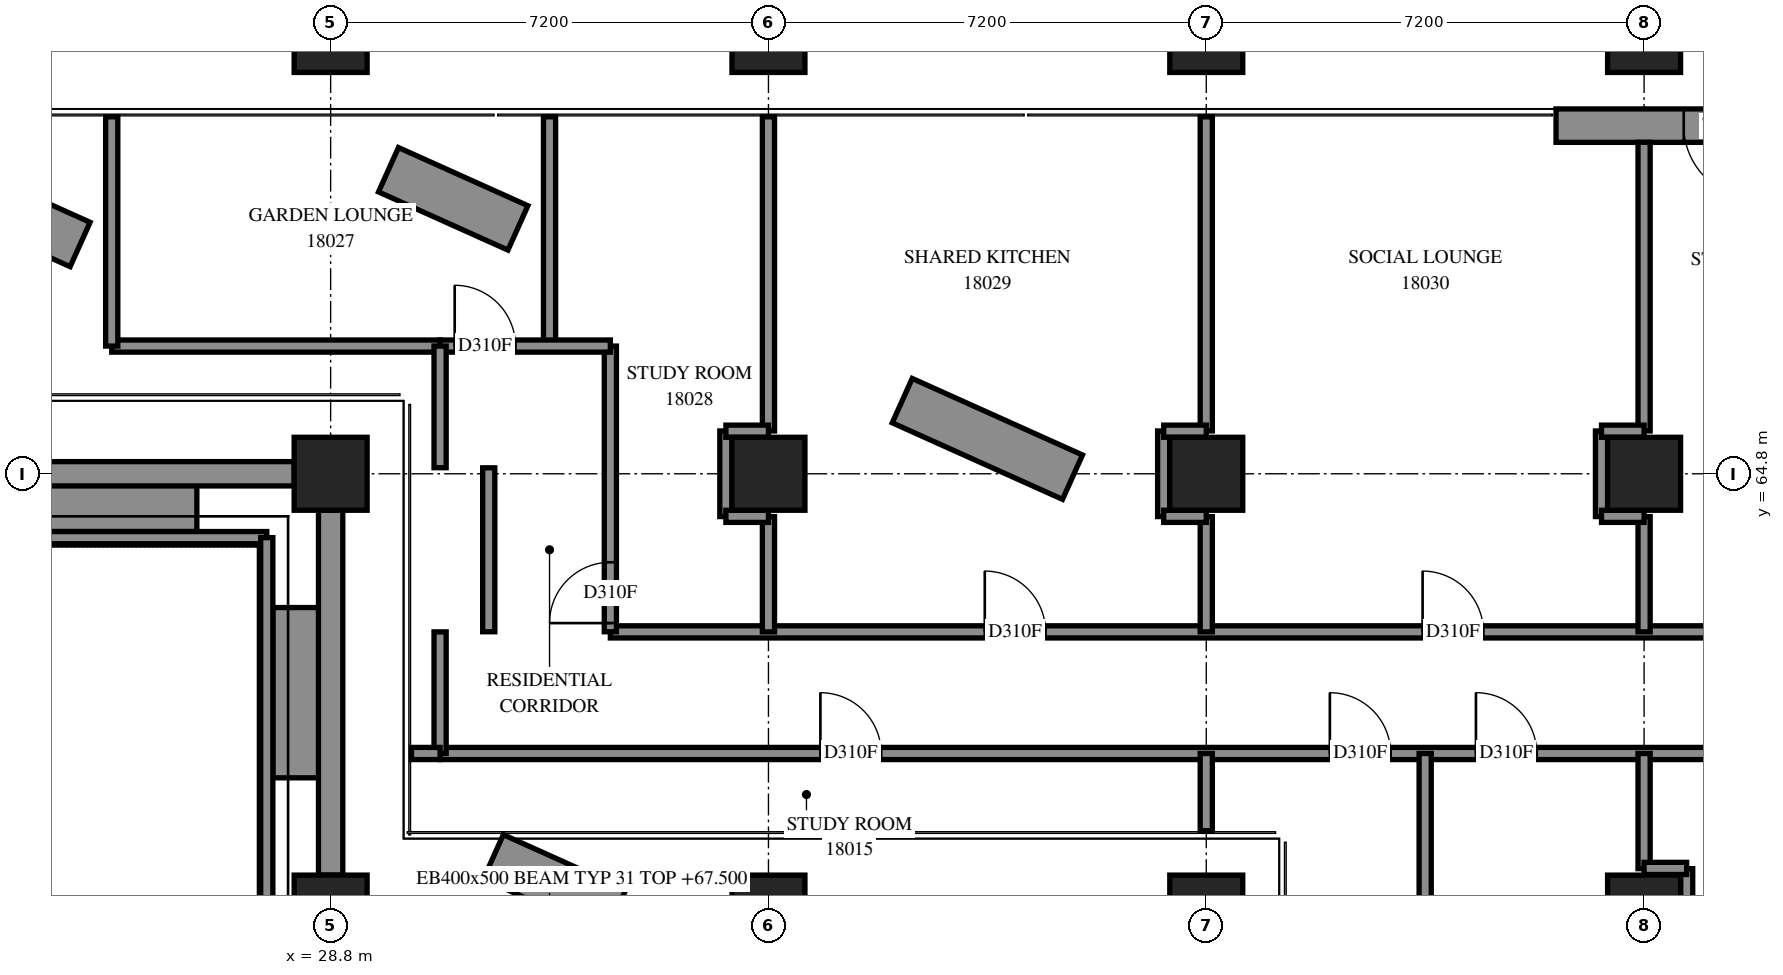
"""IFC4 building model, lengths in metres.
Left out: names, types, materials, properties, quantities, classifications, styles, units other than length and angle.
Written with IfcOpenShell. Run it as: python <this file> out.ifc"""

import sys

from ifc_helpers import new_model, si_unit, direction, frame, frame_2d, origin, origin_2d, place, context, subcontext, project, spatial, polyline, rectangle, outline, extrude, element, fill, save


model = new_model("IFC4")
c1 = context("Model", 3, precision=1e-05, world=origin(), true_north=direction((0.0, 1.0)))
c2 = subcontext(c1, "Body", "Model", "MODEL_VIEW")
j1 = project(units=[si_unit("LENGTHUNIT", "METRE"), si_unit("PLANEANGLEUNIT", "RADIAN")], contexts=[c1])
p1 = place(None, origin())
s1 = spatial("IfcSite", under=j1, at=p1, CompositionType="ELEMENT")
p2 = place(p1, origin())
s2 = spatial("IfcBuilding", under=s1, at=p2, CompositionType="ELEMENT")
p3 = place(p2, frame((0.0, 0.0, 67.8)))
s3 = spatial("IfcBuildingStorey", under=s2, at=p3, CompositionType="ELEMENT", Elevation=67.8)
for number, where, z_axis, x_axis in (
    (1, (28.8, 57.6, 0.0), (0.0, 0.0, 1.0), (1.0, 0.0, 0.0)),
    (2, (28.8, 64.8, 0.0), (0.0, 0.0, 1.0), (1.0, 0.0, 0.0)),
    (3, (28.8, 72.0, 0.0), (0.0, 0.0, 1.0), (1.0, 0.0, 0.0)),
    (4, (36.0, 57.6, 0.0), (0.0, 0.0, 1.0), (1.0, 0.0, 0.0)),
    (5, (36.0, 64.8, 0.0), (0.0, 0.0, 1.0), (1.0, 0.0, 0.0)),
    (6, (36.0, 72.0, 0.0), (0.0, 0.0, 1.0), (1.0, 0.0, 0.0)),
    (7, (43.2, 57.6, 0.0), (0.0, 0.0, 1.0), (1.0, 0.0, 0.0)),
    (8, (43.2, 64.8, 0.0), (0.0, 0.0, 1.0), (1.0, 0.0, 0.0)),
    (9, (43.2, 72.0, 0.0), (0.0, 0.0, 1.0), (1.0, 0.0, 0.0)),
    (10, (50.4, 57.6, 0.0), (0.0, 0.0, 1.0), (1.0, 0.0, 0.0)),
    (11, (50.4, 64.8, 0.0), (0.0, 0.0, 1.0), (1.0, 0.0, 0.0)),
    (12, (50.4, 72.0, 0.0), (0.0, 0.0, 1.0), (1.0, 0.0, 0.0)),
):
    element("IfcColumn", number, at=place(p3, frame(where, z_axis=z_axis, x_axis=x_axis)), inside=s3, PredefinedType="COLUMN", context=c2, shape_type="SweptSolid", body=[
        extrude(rectangle(XDim=1.2, YDim=1.2, at=origin_2d()), origin(), (0.0, 0.0, 1.0), 3.9),
    ])
p4 = place(p3, frame((52.552, 70.525, 0.0), z_axis=(0.0, 0.0, 1.0), x_axis=(-1.0, 0.0, 0.0)))
e13 = element("IfcWall", 13, at=p4, inside=s3, PredefinedType="SOLIDWALL", context=c2, shape_type="SweptSolid", body=[
    extrude(rectangle(XDim=3.6, YDim=0.55, at=frame_2d((1.8, 0.0))), origin(), (0.0, 0.0, 1.0), 3.9),
])
p5 = place(p4, frame((0.3, 0.0, 0.0)))
e14 = element("IfcOpeningElement", 14, at=p5, cuts=e13, PredefinedType="OPENING", context=c2, shape_type="SweptSolid", body=[
    extrude(rectangle(XDim=1.2, YDim=2.4, at=frame_2d((0.6, 1.2))), frame((0.0, 0.285, 0.0), z_axis=(0.0, -1.0, 0.0), x_axis=(1.0, 0.0, 0.0)), (0.0, 0.0, 1.0), 0.57),
])
for number, where, z_axis, x_axis in (
    (15, (23.8, 64.25, 0.0), (0.0, 0.0, 1.0), (1.0, 0.0, 0.0)),
    (16, (28.25, 62.6, 0.0), (0.0, 0.0, 1.0), (0.0, -1.0, 0.0)),
):
    element("IfcWall", number, at=place(p3, frame(where, z_axis=z_axis, x_axis=x_axis)), inside=s3, PredefinedType="SOLIDWALL", context=c2, shape_type="SweptSolid", body=[
        extrude(rectangle(XDim=2.8, YDim=0.8, at=frame_2d((1.4, 0.0))), origin(), (0.0, 0.0, 1.0), 0.65),
    ])
p6 = place(p3, frame((41.0, 64.744, 0.0), z_axis=(0.0, 0.0, 1.0), x_axis=(-0.9121164493, 0.4099311928, 0.0)))
e17 = element("IfcWall", 17, at=p6, inside=s3, PredefinedType="SOLIDWALL", context=c2, shape_type="SweptSolid", body=[
    extrude(rectangle(XDim=3.07, YDim=0.8, at=frame_2d((1.535, 0.0))), origin(), (0.0, 0.0, 1.0), 0.65),
])
p7 = place(p3, frame((31.88, 68.843, 0.0), z_axis=(0.0, 0.0, 1.0), x_axis=(-0.9121090242, 0.4099477137, 0.0)))
e18 = element("IfcWall", 18, at=p7, inside=s3, PredefinedType="SOLIDWALL", context=c2, shape_type="SweptSolid", body=[
    extrude(rectangle(XDim=2.334, YDim=0.8, at=frame_2d((1.167, 0.0))), origin(), (0.0, 0.0, 1.0), 0.65),
])
p8 = place(p3, frame((33.49, 57.594, 0.0), z_axis=(0.0, 0.0, 1.0), x_axis=(-0.9121179196, 0.4099279215, 0.0)))
e19 = element("IfcWall", 19, at=p8, inside=s3, PredefinedType="SOLIDWALL", context=c2, shape_type="SweptSolid", body=[
    extrude(rectangle(XDim=2.209, YDim=0.8, at=frame_2d((1.104, 0.0))), origin(), (0.0, 0.0, 1.0), 0.65),
])
p9 = place(p3, frame((20.55, 63.75, 0.0), z_axis=(0.0, 0.0, 1.0), x_axis=(1.0, 0.0, 0.0)))
e20 = element("IfcWall", 20, at=p9, inside=s3, PredefinedType="SOLIDWALL", context=c2, shape_type="SweptSolid", body=[
    extrude(outline(polyline([(-0.1, -0.1), (7.1, -0.1), (7.3, 0.1), (0.1, 0.1), (-0.1, -0.1)])), origin(), (0.0, 0.0, 1.0), 4.2),
])
p10 = place(p3, frame((27.75, 63.75, 0.0), z_axis=(0.0, 0.0, 1.0), x_axis=(0.0, -1.0, 0.0)))
e21 = element("IfcWall", 21, at=p10, inside=s3, PredefinedType="SOLIDWALL", context=c2, shape_type="SweptSolid", body=[
    extrude(outline(polyline([(0.1, -0.1), (7.3, -0.1), (7.1, 0.1), (-0.1, 0.1), (0.1, -0.1)])), origin(), (0.0, 0.0, 1.0), 4.2),
])
p11 = place(p3, frame((30.6, 60.2, 0.0), z_axis=(0.0, 0.0, 1.0), x_axis=(1.0, 0.0, 0.0)))
e22 = element("IfcWall", 22, at=p11, inside=s3, PredefinedType="PARTITIONING", context=c2, shape_type="SweptSolid", body=[
    extrude(rectangle(XDim=22.4, YDim=0.2, at=frame_2d((11.2, 0.0))), origin(), (0.0, 0.0, 1.0), 3.9),
])
p12 = place(p11, frame((6.254, 0.0, 0.0)))
e23 = element("IfcOpeningElement", 23, at=p12, cuts=e22, PredefinedType="OPENING", context=c2, shape_type="SweptSolid", body=[
    extrude(rectangle(XDim=1.0, YDim=2.1, at=frame_2d((0.5, 1.05))), frame((0.0, 0.11, 0.0), z_axis=(0.0, -1.0, 0.0), x_axis=(1.0, 0.0, 0.0)), (0.0, 0.0, 1.0), 0.22),
])
p13 = place(p11, frame((14.633, 0.0, 0.0)))
e24 = element("IfcOpeningElement", 24, at=p13, cuts=e22, PredefinedType="OPENING", context=c2, shape_type="SweptSolid", body=[
    extrude(rectangle(XDim=1.0, YDim=2.1, at=frame_2d((0.5, 1.05))), frame((0.0, 0.11, 0.0), z_axis=(0.0, -1.0, 0.0), x_axis=(1.0, 0.0, 0.0)), (0.0, 0.0, 1.0), 0.22),
])
p14 = place(p11, frame((17.035, 0.0, 0.0)))
e25 = element("IfcOpeningElement", 25, at=p14, cuts=e22, PredefinedType="OPENING", context=c2, shape_type="SweptSolid", body=[
    extrude(rectangle(XDim=1.0, YDim=2.1, at=frame_2d((0.5, 1.05))), frame((0.0, 0.11, 0.0), z_axis=(0.0, -1.0, 0.0), x_axis=(1.0, 0.0, 0.0)), (0.0, 0.0, 1.0), 0.22),
])
p15 = place(p11, frame((21.205, 0.0, 0.0)))
e26 = element("IfcOpeningElement", 26, at=p15, cuts=e22, PredefinedType="OPENING", context=c2, shape_type="SweptSolid", body=[
    extrude(rectangle(XDim=1.0, YDim=2.1, at=frame_2d((0.5, 1.05))), frame((0.0, 0.11, 0.0), z_axis=(0.0, -1.0, 0.0), x_axis=(1.0, 0.0, 0.0)), (0.0, 0.0, 1.0), 0.22),
])
p16 = place(p3, frame((33.4, 62.2, 0.0), z_axis=(0.0, 0.0, 1.0), x_axis=(1.0, 0.0, 0.0)))
e27 = element("IfcWall", 27, at=p16, inside=s3, PredefinedType="PARTITIONING", context=c2, shape_type="SweptSolid", body=[
    extrude(rectangle(XDim=21.3, YDim=0.2, at=frame_2d((10.65, 0.0))), origin(), (0.0, 0.0, 1.0), 3.9),
])
p17 = place(p16, frame((6.157, 0.0, 0.0)))
e28 = element("IfcOpeningElement", 28, at=p17, cuts=e27, PredefinedType="OPENING", context=c2, shape_type="SweptSolid", body=[
    extrude(rectangle(XDim=1.0, YDim=2.1, at=frame_2d((0.5, 1.05))), frame((0.0, 0.11, 0.0), z_axis=(0.0, -1.0, 0.0), x_axis=(1.0, 0.0, 0.0)), (0.0, 0.0, 1.0), 0.22),
])
p18 = place(p16, frame((13.357, 0.0, 0.0)))
e29 = element("IfcOpeningElement", 29, at=p18, cuts=e27, PredefinedType="OPENING", context=c2, shape_type="SweptSolid", body=[
    extrude(rectangle(XDim=1.0, YDim=2.1, at=frame_2d((0.5, 1.05))), frame((0.0, 0.11, 0.0), z_axis=(0.0, -1.0, 0.0), x_axis=(1.0, 0.0, 0.0)), (0.0, 0.0, 1.0), 0.22),
])
p19 = place(p16, frame((18.765, 0.0, 0.0)))
e30 = element("IfcOpeningElement", 30, at=p19, cuts=e27, PredefinedType="OPENING", context=c2, shape_type="SweptSolid", body=[
    extrude(rectangle(XDim=1.0, YDim=2.1, at=frame_2d((0.5, 1.05))), frame((0.0, 0.11, 0.0), z_axis=(0.0, -1.0, 0.0), x_axis=(1.0, 0.0, 0.0)), (0.0, 0.0, 1.0), 0.22),
])
p20 = place(p3, frame((46.8, 51.73, 0.0), z_axis=(0.0, 0.0, 1.0), x_axis=(0.0, 1.0, 0.0)))
e31 = element("IfcWall", 31, at=p20, inside=s3, PredefinedType="PARTITIONING", context=c2, shape_type="SweptSolid", body=[
    extrude(rectangle(XDim=8.47, YDim=0.2, at=frame_2d((4.235, 0.0))), origin(), (0.0, 0.0, 1.0), 3.9),
])
p21 = place(p3, frame((25.2, 66.9, 0.0), z_axis=(0.0, 0.0, 1.0), x_axis=(1.0, 0.0, 0.0)))
e32 = element("IfcWall", 32, at=p21, inside=s3, PredefinedType="PARTITIONING", context=c2, shape_type="SweptSolid", body=[
    extrude(rectangle(XDim=5.4, YDim=0.2, at=frame_2d((2.7, 0.0))), origin(), (0.0, 0.0, 1.0), 3.9),
])
for number, where, z_axis, x_axis in (
    (33, (36.0, 65.504, 0.0), (0.0, 0.0, 1.0), (0.0, 1.0, 0.0)),
    (34, (43.2, 65.504, 0.0), (0.0, 0.0, 1.0), (0.0, 1.0, 0.0)),
):
    element("IfcWall", number, at=place(p3, frame(where, z_axis=z_axis, x_axis=x_axis)), inside=s3, PredefinedType="PARTITIONING", context=c2, shape_type="SweptSolid", body=[
        extrude(rectangle(XDim=5.166, YDim=0.2, at=frame_2d((2.583, 0.0))), origin(), (0.0, 0.0, 1.0), 3.9),
    ])
p22 = place(p3, frame((50.4, 65.504, 0.0), z_axis=(0.0, 0.0, 1.0), x_axis=(0.0, 1.0, 0.0)))
e35 = element("IfcWall", 35, at=p22, inside=s3, PredefinedType="PARTITIONING", context=c2, shape_type="SweptSolid", body=[
    extrude(rectangle(XDim=4.746, YDim=0.2, at=frame_2d((2.373, 0.0))), origin(), (0.0, 0.0, 1.0), 3.9),
])
p23 = place(p3, frame((33.4, 62.202, 0.0), z_axis=(0.0, 0.0, 1.0), x_axis=(0.0, 1.0, 0.0)))
e36 = element("IfcWall", 36, at=p23, inside=s3, PredefinedType="PARTITIONING", context=c2, shape_type="SweptSolid", body=[
    extrude(rectangle(XDim=4.698, YDim=0.2, at=frame_2d((2.349, 0.0))), origin(), (0.0, 0.0, 1.0), 3.9),
])
p24 = place(p23, frame((0.142, 0.0, 0.0)))
e37 = element("IfcOpeningElement", 37, at=p24, cuts=e36, PredefinedType="OPENING", context=c2, shape_type="SweptSolid", body=[
    extrude(rectangle(XDim=1.0, YDim=2.1, at=frame_2d((0.5, 1.05))), frame((0.0, 0.11, 0.0), z_axis=(0.0, -1.0, 0.0), x_axis=(1.0, 0.0, 0.0)), (0.0, 0.0, 1.0), 0.22),
])
for number, where, z_axis, x_axis in (
    (38, (25.2, 66.9, 0.0), (0.0, 0.0, 1.0), (0.0, 1.0, 0.0)),
    (39, (32.4, 66.9, 0.0), (0.0, 0.0, 1.0), (0.0, 1.0, 0.0)),
):
    element("IfcWall", number, at=place(p3, frame(where, z_axis=z_axis, x_axis=x_axis)), inside=s3, PredefinedType="PARTITIONING", context=c2, shape_type="SweptSolid", body=[
        extrude(rectangle(XDim=3.77, YDim=0.2, at=frame_2d((1.885, 0.0))), origin(), (0.0, 0.0, 1.0), 3.9),
    ])
p25 = place(p3, frame((30.6, 66.9, 0.0), z_axis=(0.0, 0.0, 1.0), x_axis=(1.0, 0.0, 0.0)))
e40 = element("IfcWall", 40, at=p25, inside=s3, PredefinedType="PARTITIONING", context=c2, shape_type="SweptSolid", body=[
    extrude(rectangle(XDim=2.8, YDim=0.2, at=frame_2d((1.4, 0.0))), origin(), (0.0, 0.0, 1.0), 3.9),
])
p26 = place(p25, frame((0.24, 0.0, 0.0)))
e41 = element("IfcOpeningElement", 41, at=p26, cuts=e40, PredefinedType="OPENING", context=c2, shape_type="SweptSolid", body=[
    extrude(rectangle(XDim=1.0, YDim=2.1, at=frame_2d((0.5, 1.05))), frame((0.0, 0.11, 0.0), z_axis=(0.0, -1.0, 0.0), x_axis=(1.0, 0.0, 0.0)), (0.0, 0.0, 1.0), 0.22),
])
p27 = place(p3, frame((31.4, 62.202, 0.0), z_axis=(0.0, 0.0, 1.0), x_axis=(0.0, 1.0, 0.0)))
e42 = element("IfcWall", 42, at=p27, inside=s3, PredefinedType="PARTITIONING", context=c2, shape_type="SweptSolid", body=[
    extrude(rectangle(XDim=2.696, YDim=0.2, at=frame_2d((1.348, 0.0))), origin(), (0.0, 0.0, 1.0), 3.9),
])
for number, where, z_axis, x_axis in (
    (43, (30.6, 60.2, 0.0), (0.0, 0.0, 1.0), (0.0, 1.0, 0.0)),
    (44, (30.6, 64.9, 0.0), (0.0, 0.0, 1.0), (0.0, 1.0, 0.0)),
):
    element("IfcWall", number, at=place(p3, frame(where, z_axis=z_axis, x_axis=x_axis)), inside=s3, PredefinedType="PARTITIONING", context=c2, shape_type="SweptSolid", body=[
        extrude(rectangle(XDim=2.0, YDim=0.2, at=frame_2d((1.0, 0.0))), origin(), (0.0, 0.0, 1.0), 3.9),
    ])
for number, where, z_axis, x_axis in (
    (45, (36.0, 62.2, 0.0), (0.0, 0.0, 1.0), (0.0, 1.0, 0.0)),
    (46, (43.2, 62.2, 0.0), (0.0, 0.0, 1.0), (0.0, 1.0, 0.0)),
    (47, (50.4, 62.2, 0.0), (0.0, 0.0, 1.0), (0.0, 1.0, 0.0)),
):
    element("IfcWall", number, at=place(p3, frame(where, z_axis=z_axis, x_axis=x_axis)), inside=s3, PredefinedType="PARTITIONING", context=c2, shape_type="SweptSolid", body=[
        extrude(rectangle(XDim=1.896, YDim=0.2, at=frame_2d((0.948, 0.0))), origin(), (0.0, 0.0, 1.0), 3.9),
    ])
p28 = place(p3, frame((50.4, 58.306, 0.0), z_axis=(0.0, 0.0, 1.0), x_axis=(0.0, 1.0, 0.0)))
e48 = element("IfcWall", 48, at=p28, inside=s3, PredefinedType="PARTITIONING", context=c2, shape_type="SweptSolid", body=[
    extrude(rectangle(XDim=1.894, YDim=0.2, at=frame_2d((0.947, 0.0))), origin(), (0.0, 0.0, 1.0), 3.9),
])
p29 = place(p3, frame((51.1, 56.894, 0.0), z_axis=(0.0, 0.0, 1.0), x_axis=(0.0, 1.0, 0.0)))
e49 = element("IfcWall", 49, at=p29, inside=s3, PredefinedType="PARTITIONING", context=c2, shape_type="SweptSolid", body=[
    extrude(rectangle(XDim=1.412, YDim=0.2, at=frame_2d((0.706, 0.0))), origin(), (0.0, 0.0, 1.0), 3.9),
])
for number, where, z_axis, x_axis in (
    (50, (35.3, 64.096, 0.0), (0.0, 0.0, 1.0), (0.0, 1.0, 0.0)),
    (51, (42.5, 64.096, 0.0), (0.0, 0.0, 1.0), (0.0, 1.0, 0.0)),
    (52, (49.7, 64.096, 0.0), (0.0, 0.0, 1.0), (0.0, 1.0, 0.0)),
):
    element("IfcWall", number, at=place(p3, frame(where, z_axis=z_axis, x_axis=x_axis)), inside=s3, PredefinedType="PARTITIONING", context=c2, shape_type="SweptSolid", body=[
        extrude(rectangle(XDim=1.408, YDim=0.2, at=frame_2d((0.704, 0.0))), origin(), (0.0, 0.0, 1.0), 3.9),
    ])
p30 = place(p3, frame((43.2, 58.93, 0.0), z_axis=(0.0, 0.0, 1.0), x_axis=(0.0, 1.0, 0.0)))
e53 = element("IfcWall", 53, at=p30, inside=s3, PredefinedType="PARTITIONING", context=c2, shape_type="SweptSolid", body=[
    extrude(rectangle(XDim=1.27, YDim=0.2, at=frame_2d((0.635, 0.0))), origin(), (0.0, 0.0, 1.0), 3.9),
])
for number, where, z_axis, x_axis in (
    (54, (35.3, 65.5, 0.0), (0.0, 0.0, 1.0), (1.0, 0.0, 0.0)),
    (55, (42.5, 65.5, 0.0), (0.0, 0.0, 1.0), (1.0, 0.0, 0.0)),
    (56, (35.3, 64.1, 0.0), (0.0, 0.0, 1.0), (1.0, 0.0, 0.0)),
    (57, (42.5, 64.1, 0.0), (0.0, 0.0, 1.0), (1.0, 0.0, 0.0)),
    (58, (50.4, 58.31, 0.0), (0.0, 0.0, 1.0), (1.0, 0.0, 0.0)),
    (59, (49.7, 65.5, 0.0), (0.0, 0.0, 1.0), (1.0, 0.0, 0.0)),
    (60, (49.7, 64.1, 0.0), (0.0, 0.0, 1.0), (1.0, 0.0, 0.0)),
):
    element("IfcWall", number, at=place(p3, frame(where, z_axis=z_axis, x_axis=x_axis)), inside=s3, PredefinedType="PARTITIONING", context=c2, shape_type="SweptSolid", body=[
        extrude(rectangle(XDim=0.7, YDim=0.2, at=frame_2d((0.35, 0.0))), origin(), (0.0, 0.0, 1.0), 3.9),
    ])
p31 = place(p3, frame((30.13, 60.2, 0.0), z_axis=(0.0, 0.0, 1.0), x_axis=(1.0, 0.0, 0.0)))
e61 = element("IfcWall", 61, at=p31, inside=s3, PredefinedType="PARTITIONING", context=c2, shape_type="SweptSolid", body=[
    extrude(rectangle(XDim=0.47, YDim=0.2, at=frame_2d((0.235, 0.0))), origin(), (0.0, 0.0, 1.0), 3.9),
])
p32 = place(p3, frame((24.68, 68.571, 0.0), z_axis=(0.0, 0.0, 1.0), x_axis=(-0.9121110429, 0.4099432222, 0.0)))
e62 = element("IfcWall", 62, at=p32, inside=s3, PredefinedType="SOLIDWALL", context=c2, shape_type="SweptSolid", body=[
    extrude(outline(polyline([(0.0, -0.4), (2.97, -0.4), (2.97, 0.4), (0.0, 0.4), (0.0, -0.4)])), origin(), (0.0, 0.0, 1.0), 0.65),
])
p33 = place(p5, origin())
e63 = element("IfcDoor", 63, at=p33, inside=s3, OperationType="SINGLE_SWING_LEFT", PredefinedType="DOOR", context=c2, shape_type="SweptSolid", body=[
    extrude(rectangle(XDim=1.2, YDim=2.4, at=frame_2d((0.6, 1.2))), frame((0.0, 0.025, 0.0), z_axis=(0.0, -1.0, 0.0), x_axis=(1.0, 0.0, 0.0)), (0.0, 0.0, 1.0), 0.05),
])
fill(e14, e63)
p34 = place(p12, origin())
e64 = element("IfcDoor", 64, at=p34, inside=s3, OperationType="SINGLE_SWING_LEFT", PredefinedType="DOOR", context=c2, shape_type="SweptSolid", body=[
    extrude(rectangle(XDim=1.0, YDim=2.1, at=frame_2d((0.5, 1.05))), frame((0.0, 0.025, 0.0), z_axis=(0.0, -1.0, 0.0), x_axis=(1.0, 0.0, 0.0)), (0.0, 0.0, 1.0), 0.05),
])
fill(e23, e64)
p35 = place(p13, origin())
e65 = element("IfcDoor", 65, at=p35, inside=s3, OperationType="SINGLE_SWING_LEFT", PredefinedType="DOOR", context=c2, shape_type="SweptSolid", body=[
    extrude(rectangle(XDim=1.0, YDim=2.1, at=frame_2d((0.5, 1.05))), frame((0.0, 0.025, 0.0), z_axis=(0.0, -1.0, 0.0), x_axis=(1.0, 0.0, 0.0)), (0.0, 0.0, 1.0), 0.05),
])
fill(e24, e65)
p36 = place(p14, origin())
e66 = element("IfcDoor", 66, at=p36, inside=s3, OperationType="SINGLE_SWING_RIGHT", PredefinedType="DOOR", context=c2, shape_type="SweptSolid", body=[
    extrude(rectangle(XDim=1.0, YDim=2.1, at=frame_2d((0.5, 1.05))), frame((0.0, 0.025, 0.0), z_axis=(0.0, -1.0, 0.0), x_axis=(1.0, 0.0, 0.0)), (0.0, 0.0, 1.0), 0.05),
])
fill(e25, e66)
p37 = place(p26, origin())
e67 = element("IfcDoor", 67, at=p37, inside=s3, OperationType="SINGLE_SWING_LEFT", PredefinedType="DOOR", context=c2, shape_type="SweptSolid", body=[
    extrude(rectangle(XDim=1.0, YDim=2.1, at=frame_2d((0.5, 1.05))), frame((0.0, 0.025, 0.0), z_axis=(0.0, -1.0, 0.0), x_axis=(1.0, 0.0, 0.0)), (0.0, 0.0, 1.0), 0.05),
])
fill(e41, e67)
p38 = place(p24, origin())
e68 = element("IfcDoor", 68, at=p38, inside=s3, OperationType="SINGLE_SWING_LEFT", PredefinedType="DOOR", context=c2, shape_type="SweptSolid", body=[
    extrude(rectangle(XDim=1.0, YDim=2.1, at=frame_2d((0.5, 1.05))), frame((0.0, 0.025, 0.0), z_axis=(0.0, -1.0, 0.0), x_axis=(1.0, 0.0, 0.0)), (0.0, 0.0, 1.0), 0.05),
])
fill(e37, e68)
p39 = place(p17, origin())
e69 = element("IfcDoor", 69, at=p39, inside=s3, OperationType="SINGLE_SWING_RIGHT", PredefinedType="DOOR", context=c2, shape_type="SweptSolid", body=[
    extrude(rectangle(XDim=1.0, YDim=2.1, at=frame_2d((0.5, 1.05))), frame((0.0, 0.025, 0.0), z_axis=(0.0, -1.0, 0.0), x_axis=(1.0, 0.0, 0.0)), (0.0, 0.0, 1.0), 0.05),
])
fill(e28, e69)
p40 = place(p18, origin())
e70 = element("IfcDoor", 70, at=p40, inside=s3, OperationType="SINGLE_SWING_RIGHT", PredefinedType="DOOR", context=c2, shape_type="SweptSolid", body=[
    extrude(rectangle(XDim=1.0, YDim=2.1, at=frame_2d((0.5, 1.05))), frame((0.0, 0.025, 0.0), z_axis=(0.0, -1.0, 0.0), x_axis=(1.0, 0.0, 0.0)), (0.0, 0.0, 1.0), 0.05),
])
fill(e29, e70)
save(model, sys.argv[1])
